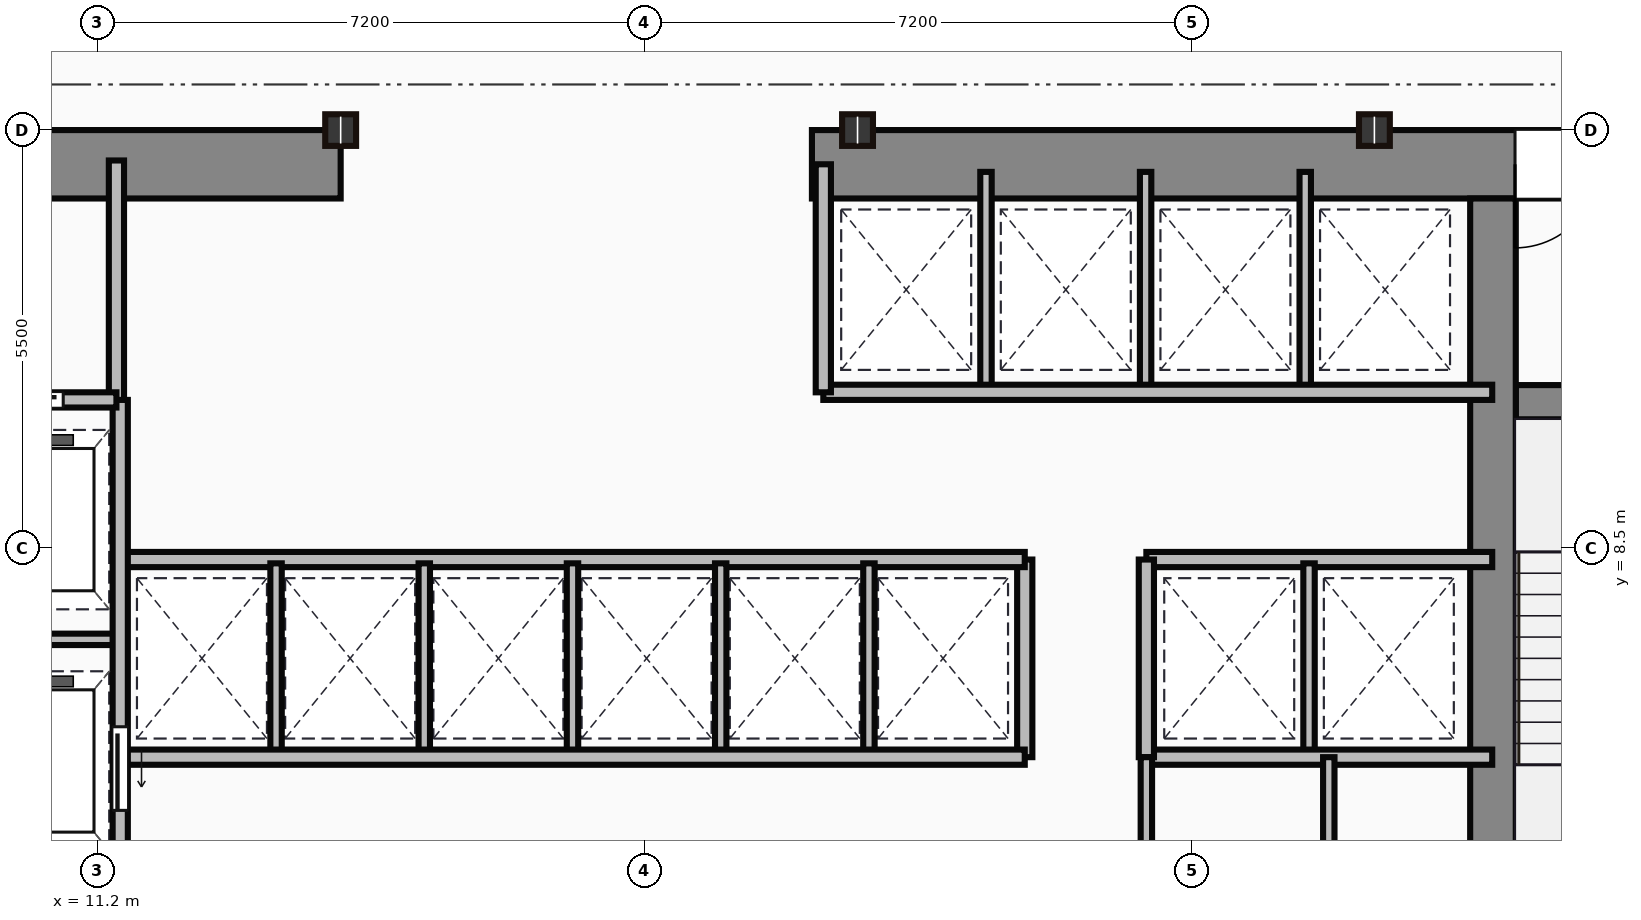
"""IFC4 building model, lengths in metres.
Left out: names, types, materials, properties, quantities, classifications, styles, units other than length and angle.
Written with IfcOpenShell. Run it as: python <this file> out.ifc"""

import sys

from ifc_helpers import new_model, si_unit, direction, frame, frame_2d, origin, origin_2d, place, context, subcontext, project, spatial, rectangle, i_section, extrude, source, transform, mapped, element, fill, save


model = new_model("IFC4")
c1 = context("Model", 3, precision=1e-05, world=origin(), true_north=direction((0.0, 1.0)))
c2 = subcontext(c1, "Body", "Model", "MODEL_VIEW")
j1 = project(units=[si_unit("LENGTHUNIT", "METRE"), si_unit("PLANEANGLEUNIT", "RADIAN")], contexts=[c1])
p1 = place(None, origin())
s1 = spatial("IfcSite", under=j1, at=p1, CompositionType="ELEMENT")
p2 = place(p1, origin())
s2 = spatial("IfcBuilding", under=s1, at=p2, CompositionType="ELEMENT")
p3 = place(p2, frame((0.0, 0.0, 65.35)))
s3 = spatial("IfcBuildingStorey", under=s2, at=p3, CompositionType="ELEMENT", Elevation=65.35)
m1 = source(origin(), c2, "Body", "SweptSolid", [
    extrude(rectangle(XDim=9.1, YDim=0.9, at=frame_2d((4.55, 0.0))), origin(), (0.0, 0.0, 1.0), 3.65),
])
p4 = place(p3, frame((5.3, 13.55, 0.0), z_axis=(0.0, 0.0, 1.0), x_axis=(1.0, 0.0, 0.0)))
e1 = element("IfcWall", 1, at=p4, inside=s3, PredefinedType="SHEAR", context=c2, shape_type="MappedRepresentation", body=[
    mapped(m1, transform((0.0, 0.0, 0.0))),
])
p5 = place(p4, frame((4.1, 0.0, 0.0)))
e2 = element("IfcOpeningElement", 2, at=p5, cuts=e1, PredefinedType="OPENING", context=c2, shape_type="SweptSolid", body=[
    extrude(rectangle(XDim=1.1, YDim=2.15, at=frame_2d((0.55, 1.075))), frame((0.0, 0.46, 0.0), z_axis=(0.0, -1.0, 0.0), x_axis=(1.0, 0.0, 0.0)), (0.0, 0.0, 1.0), 0.92),
])
m2 = source(origin(), c2, "Body", "SweptSolid", [
    extrude(rectangle(XDim=12.6, YDim=0.9, at=frame_2d((6.3, 0.0))), origin(), (0.0, 0.0, 1.0), 3.65),
])
p6 = place(p3, frame((20.6, 13.55, 0.0), z_axis=(0.0, 0.0, 1.0), x_axis=(1.0, 0.0, 0.0)))
e3 = element("IfcWall", 3, at=p6, inside=s3, PredefinedType="SHEAR", context=c2, shape_type="MappedRepresentation", body=[
    mapped(m2, transform((0.0, 0.0, 0.0))),
])
p7 = place(p6, frame((9.25, 0.0, 0.0)))
e4 = element("IfcOpeningElement", 4, at=p7, cuts=e3, PredefinedType="OPENING", context=c2, shape_type="SweptSolid", body=[
    extrude(rectangle(XDim=1.1, YDim=2.15, at=frame_2d((0.55, 1.075))), frame((0.0, 0.46, 0.0), z_axis=(0.0, -1.0, 0.0), x_axis=(1.0, 0.0, 0.0)), (0.0, 0.0, 1.0), 0.92),
])
m3 = source(origin(), c2, "Body", "SweptSolid", [
    extrude(rectangle(XDim=12.2, YDim=0.6, at=frame_2d((6.1, 0.0))), origin(), (0.0, 0.0, 1.0), 3.65),
])
p8 = place(p3, frame((29.56, 0.9, 0.0), z_axis=(0.0, 0.0, 1.0), x_axis=(0.0, 1.0, 0.0)))
e5 = element("IfcWall", 5, at=p8, inside=s3, PredefinedType="SHEAR", context=c2, shape_type="MappedRepresentation", body=[
    mapped(m3, transform((0.0, 0.0, 0.0))),
])
m4 = source(origin(), c2, "Body", "SweptSolid", [
    extrude(rectangle(XDim=3.39, YDim=0.45, at=frame_2d((1.695, 0.0))), origin(), (0.0, 0.0, 1.0), 3.65),
])
p9 = place(p3, frame((29.86, 10.42, 0.0), z_axis=(0.0, 0.0, 1.0), x_axis=(1.0, 0.0, 0.0)))
e6 = element("IfcWall", 6, at=p9, inside=s3, PredefinedType="SHEAR", context=c2, shape_type="MappedRepresentation", body=[
    mapped(m4, transform((0.0, 0.0, 0.0))),
])
p10 = place(p9, frame((1.1, 0.0, 0.0)))
e7 = element("IfcOpeningElement", 7, at=p10, cuts=e6, PredefinedType="OPENING", context=c2, shape_type="SweptSolid", body=[
    extrude(rectangle(XDim=1.1, YDim=2.15, at=frame_2d((0.55, 1.075))), frame((0.0, 0.235, 0.0), z_axis=(0.0, -1.0, 0.0), x_axis=(1.0, 0.0, 0.0)), (0.0, 0.0, 1.0), 0.47),
])
m5 = source(origin(), c2, "Body", "SweptSolid", [
    extrude(i_section(OverallWidth=0.406, OverallDepth=0.416, WebThickness=0.03, FlangeThickness=0.048, at=origin_2d()), origin(), (0.0, 0.0, 1.0), 3.65),
])
for number, where, z_axis, x_axis in (
    (8, (14.4, 14.0, 0.0), (0.0, 0.0, 1.0), (1.0, 0.0, 0.0)),
    (9, (21.2, 14.0, 0.0), (0.0, 0.0, 1.0), (1.0, 0.0, 0.0)),
    (10, (28.0, 14.0, 0.0), (0.0, 0.0, 1.0), (1.0, 0.0, 0.0)),
):
    element("IfcColumn", number, at=place(p3, frame(where, z_axis=z_axis, x_axis=x_axis)), inside=s3, PredefinedType="COLUMN", context=c2, shape_type="MappedRepresentation", body=[
        mapped(m5, transform((0.0, 0.0, 0.0))),
    ])
m6 = source(origin(), c2, "Body", "SweptSolid", [
    extrude(rectangle(XDim=3.18, YDim=0.2, at=frame_2d((1.59, 0.0))), origin(), (0.0, 0.0, 1.0), 3.4),
])
p11 = place(p3, frame((11.45, 10.42, 0.0), z_axis=(0.0, 0.0, 1.0), x_axis=(0.0, 1.0, 0.0)))
e11 = element("IfcWall", 11, at=p11, inside=s3, PredefinedType="PARTITIONING", context=c2, shape_type="MappedRepresentation", body=[
    mapped(m6, transform((0.0, 0.0, 0.0))),
])
m7 = source(origin(), c2, "Body", "SweptSolid", [
    extrude(rectangle(XDim=2.35, YDim=0.2, at=frame_2d((1.175, 0.0))), origin(), (0.0, 0.0, 1.0), 3.4),
])
p12 = place(p3, frame((9.1, 10.45, 0.0), z_axis=(0.0, 0.0, 1.0), x_axis=(1.0, 0.0, 0.0)))
e12 = element("IfcWall", 12, at=p12, inside=s3, PredefinedType="PARTITIONING", context=c2, shape_type="MappedRepresentation", body=[
    mapped(m7, transform((0.0, 0.0, 0.0))),
])
p13 = place(p12, frame((0.55, 0.0, 0.0)))
e13 = element("IfcOpeningElement", 13, at=p13, cuts=e12, PredefinedType="OPENING", context=c2, shape_type="SweptSolid", body=[
    extrude(rectangle(XDim=1.1, YDim=2.15, at=frame_2d((0.55, 1.075))), frame((0.0, 0.11, 0.0), z_axis=(0.0, -1.0, 0.0), x_axis=(1.0, 0.0, 0.0)), (0.0, 0.0, 1.0), 0.22),
])
m8 = source(origin(), c2, "Body", "SweptSolid", [
    extrude(rectangle(XDim=9.6, YDim=0.2, at=frame_2d((4.8, 0.0))), origin(), (0.0, 0.0, 1.0), 3.4),
])
p14 = place(p3, frame((11.5, 0.85, 0.0), z_axis=(0.0, 0.0, 1.0), x_axis=(0.0, 1.0, 0.0)))
e14 = element("IfcWall", 14, at=p14, inside=s3, PredefinedType="PARTITIONING", context=c2, shape_type="MappedRepresentation", body=[
    mapped(m8, transform((0.0, 0.0, 0.0))),
])
p15 = place(p14, frame((4.2, 0.0, 0.0)))
e15 = element("IfcOpeningElement", 15, at=p15, cuts=e14, PredefinedType="OPENING", context=c2, shape_type="SweptSolid", body=[
    extrude(rectangle(XDim=1.1, YDim=2.15, at=frame_2d((0.55, 1.075))), frame((0.0, 0.11, 0.0), z_axis=(0.0, -1.0, 0.0), x_axis=(1.0, 0.0, 0.0)), (0.0, 0.0, 1.0), 0.22),
])
p16 = place(p14, frame((0.9, 0.0, 0.0)))
e16 = element("IfcOpeningElement", 16, at=p16, cuts=e14, PredefinedType="OPENING", context=c2, shape_type="SweptSolid", body=[
    extrude(rectangle(XDim=1.2, YDim=2.15, at=frame_2d((0.6, 1.075))), frame((0.0, 0.11, 0.0), z_axis=(0.0, -1.0, 0.0), x_axis=(1.0, 0.0, 0.0)), (0.0, 0.0, 1.0), 0.22),
])
m9 = source(origin(), c2, "Body", "SweptSolid", [
    extrude(rectangle(XDim=2.4, YDim=0.15, at=frame_2d((1.2, 0.0))), origin(), (0.0, 0.0, 1.0), 3.4),
])
p17 = place(p3, frame((9.1, 7.3, 0.0), z_axis=(0.0, 0.0, 1.0), x_axis=(1.0, 0.0, 0.0)))
e17 = element("IfcWall", 17, at=p17, inside=s3, PredefinedType="PARTITIONING", context=c2, shape_type="MappedRepresentation", body=[
    mapped(m9, transform((0.0, 0.0, 0.0))),
])
m10 = source(origin(), c2, "Body", "SweptSolid", [
    extrude(rectangle(XDim=11.85, YDim=0.2, at=frame_2d((5.925, 0.0))), origin(), (0.0, 0.0, 1.0), 3.4),
])
for number, where, z_axis, x_axis in (
    (18, (11.55, 5.75, 0.0), (0.0, 0.0, 1.0), (1.0, 0.0, 0.0)),
    (19, (11.55, 8.35, 0.0), (0.0, 0.0, 1.0), (1.0, 0.0, 0.0)),
):
    element("IfcWall", number, at=place(p3, frame(where, z_axis=z_axis, x_axis=x_axis)), inside=s3, PredefinedType="PARTITIONING", context=c2, shape_type="MappedRepresentation", body=[
        mapped(m10, transform((0.0, 0.0, 0.0))),
    ])
m11 = source(origin(), c2, "Body", "SweptSolid", [
    extrude(rectangle(XDim=2.6, YDim=0.2, at=frame_2d((1.3, 0.0))), origin(), (0.0, 0.0, 1.0), 3.4),
])
p18 = place(p3, frame((23.4, 5.75, 0.0), z_axis=(0.0, 0.0, 1.0), x_axis=(0.0, 1.0, 0.0)))
e20 = element("IfcWall", 20, at=p18, inside=s3, PredefinedType="PARTITIONING", context=c2, shape_type="MappedRepresentation", body=[
    mapped(m11, transform((0.0, 0.0, 0.0))),
])
m12 = source(origin(), c2, "Body", "SweptSolid", [
    extrude(rectangle(XDim=2.5, YDim=0.15, at=frame_2d((1.25, 0.0))), origin(), (0.0, 0.0, 1.0), 3.4),
])
for number, where, z_axis, x_axis in (
    (21, (13.55, 5.8, 0.0), (0.0, 0.0, 1.0), (0.0, 1.0, 0.0)),
    (22, (15.5, 5.8, 0.0), (0.0, 0.0, 1.0), (0.0, 1.0, 0.0)),
    (23, (17.45, 5.8, 0.0), (0.0, 0.0, 1.0), (0.0, 1.0, 0.0)),
    (24, (19.4, 5.8, 0.0), (0.0, 0.0, 1.0), (0.0, 1.0, 0.0)),
    (25, (21.35, 5.8, 0.0), (0.0, 0.0, 1.0), (0.0, 1.0, 0.0)),
):
    element("IfcWall", number, at=place(p3, frame(where, z_axis=z_axis, x_axis=x_axis)), inside=s3, PredefinedType="PARTITIONING", context=c2, shape_type="MappedRepresentation", body=[
        mapped(m12, transform((0.0, 0.0, 0.0))),
    ])
m13 = source(origin(), c2, "Body", "SweptSolid", [
    extrude(rectangle(XDim=8.8, YDim=0.2, at=frame_2d((4.4, 0.0))), origin(), (0.0, 0.0, 1.0), 3.4),
])
p19 = place(p3, frame((20.75, 10.55, 0.0), z_axis=(0.0, 0.0, 1.0), x_axis=(1.0, 0.0, 0.0)))
e26 = element("IfcWall", 26, at=p19, inside=s3, PredefinedType="PARTITIONING", context=c2, shape_type="MappedRepresentation", body=[
    mapped(m13, transform((0.0, 0.0, 0.0))),
])
m14 = source(origin(), c2, "Body", "SweptSolid", [
    extrude(rectangle(XDim=3.0, YDim=0.2, at=frame_2d((1.5, 0.0))), origin(), (0.0, 0.0, 1.0), 3.4),
])
p20 = place(p3, frame((20.75, 10.55, 0.0), z_axis=(0.0, 0.0, 1.0), x_axis=(0.0, 1.0, 0.0)))
e27 = element("IfcWall", 27, at=p20, inside=s3, PredefinedType="PARTITIONING", context=c2, shape_type="MappedRepresentation", body=[
    mapped(m14, transform((0.0, 0.0, 0.0))),
])
m15 = source(origin(), c2, "Body", "SweptSolid", [
    extrude(rectangle(XDim=2.85, YDim=0.15, at=frame_2d((1.425, 0.0))), origin(), (0.0, 0.0, 1.0), 3.4),
])
for number, where, z_axis, x_axis in (
    (28, (22.89, 10.6, 0.0), (0.0, 0.0, 1.0), (0.0, 1.0, 0.0)),
    (29, (24.99, 10.6, 0.0), (0.0, 0.0, 1.0), (0.0, 1.0, 0.0)),
    (30, (27.09, 10.6, 0.0), (0.0, 0.0, 1.0), (0.0, 1.0, 0.0)),
):
    element("IfcWall", number, at=place(p3, frame(where, z_axis=z_axis, x_axis=x_axis)), inside=s3, PredefinedType="PARTITIONING", context=c2, shape_type="MappedRepresentation", body=[
        mapped(m15, transform((0.0, 0.0, 0.0))),
    ])
m16 = source(origin(), c2, "Body", "SweptSolid", [
    extrude(rectangle(XDim=4.55, YDim=0.2, at=frame_2d((2.275, 0.0))), origin(), (0.0, 0.0, 1.0), 3.4),
])
for number, where, z_axis, x_axis in (
    (31, (25.0, 8.35, 0.0), (0.0, 0.0, 1.0), (1.0, 0.0, 0.0)),
    (32, (25.0, 5.75, 0.0), (0.0, 0.0, 1.0), (1.0, 0.0, 0.0)),
):
    element("IfcWall", number, at=place(p3, frame(where, z_axis=z_axis, x_axis=x_axis)), inside=s3, PredefinedType="PARTITIONING", context=c2, shape_type="MappedRepresentation", body=[
        mapped(m16, transform((0.0, 0.0, 0.0))),
    ])
p21 = place(p3, frame((25.0, 5.75, 0.0), z_axis=(0.0, 0.0, 1.0), x_axis=(0.0, 1.0, 0.0)))
e33 = element("IfcWall", 33, at=p21, inside=s3, PredefinedType="PARTITIONING", context=c2, shape_type="MappedRepresentation", body=[
    mapped(m11, transform((0.0, 0.0, 0.0))),
])
p22 = place(p3, frame((27.14, 5.8, 0.0), z_axis=(0.0, 0.0, 1.0), x_axis=(0.0, 1.0, 0.0)))
e34 = element("IfcWall", 34, at=p22, inside=s3, PredefinedType="PARTITIONING", context=c2, shape_type="MappedRepresentation", body=[
    mapped(m12, transform((0.0, 0.0, 0.0))),
])
m17 = source(origin(), c2, "Body", "SweptSolid", [
    extrude(rectangle(XDim=4.9, YDim=0.15, at=frame_2d((2.45, 0.0))), origin(), (0.0, 0.0, 1.0), 3.4),
])
p23 = place(p3, frame((25.0, 0.85, 0.0), z_axis=(0.0, 0.0, 1.0), x_axis=(0.0, 1.0, 0.0)))
e35 = element("IfcWall", 35, at=p23, inside=s3, PredefinedType="PARTITIONING", context=c2, shape_type="MappedRepresentation", body=[
    mapped(m17, transform((0.0, 0.0, 0.0))),
])
p24 = place(p23, frame((2.5, 0.0, 0.0)))
e36 = element("IfcOpeningElement", 36, at=p24, cuts=e35, PredefinedType="OPENING", context=c2, shape_type="SweptSolid", body=[
    extrude(rectangle(XDim=0.95, YDim=2.15, at=frame_2d((0.475, 1.075))), frame((0.0, 0.085, 0.0), z_axis=(0.0, -1.0, 0.0), x_axis=(1.0, 0.0, 0.0)), (0.0, 0.0, 1.0), 0.17),
])
m18 = source(origin(), c2, "Body", "SweptSolid", [
    extrude(rectangle(XDim=3.4, YDim=0.15, at=frame_2d((1.7, 0.0))), origin(), (0.0, 0.0, 1.0), 3.4),
])
p25 = place(p3, frame((27.4, 2.35, 0.0), z_axis=(0.0, 0.0, 1.0), x_axis=(0.0, 1.0, 0.0)))
e37 = element("IfcWall", 37, at=p25, inside=s3, PredefinedType="PARTITIONING", context=c2, shape_type="MappedRepresentation", body=[
    mapped(m18, transform((0.0, 0.0, 0.0))),
])
p26 = place(p25, frame((1.1, 0.0, 0.0)))
e38 = element("IfcOpeningElement", 38, at=p26, cuts=e37, PredefinedType="OPENING", context=c2, shape_type="SweptSolid", body=[
    extrude(rectangle(XDim=0.85, YDim=2.1, at=frame_2d((0.425, 1.05))), frame((0.0, 0.085, 0.0), z_axis=(0.0, -1.0, 0.0), x_axis=(1.0, 0.0, 0.0)), (0.0, 0.0, 1.0), 0.17),
])
m19 = source(origin(), c2, "Body", "SweptSolid", [
    extrude(rectangle(XDim=1.1, YDim=2.15, at=frame_2d((0.55, 1.075))), frame((0.0, 0.025, 0.0), z_axis=(0.0, -1.0, 0.0), x_axis=(1.0, 0.0, 0.0)), (0.0, 0.0, 1.0), 0.05),
])
p27 = place(p7, origin())
e39 = element("IfcDoor", 39, at=p27, inside=s3, OperationType="SINGLE_SWING_LEFT", PredefinedType="DOOR", context=c2, shape_type="MappedRepresentation", body=[
    mapped(m19, transform((0.0, 0.0, 0.0))),
])
fill(e4, e39)
p28 = place(p13, origin())
e40 = element("IfcDoor", 40, at=p28, inside=s3, OperationType="SLIDING_TO_LEFT", PredefinedType="DOOR", context=c2, shape_type="MappedRepresentation", body=[
    mapped(m19, transform((0.0, 0.0, 0.0))),
])
fill(e13, e40)
p29 = place(p15, frame((1.1, 0.0, 0.0), z_axis=(0.0, 0.0, 1.0), x_axis=(-1.0, 0.0, 0.0)))
e41 = element("IfcDoor", 41, at=p29, inside=s3, OperationType="SLIDING_TO_LEFT", PredefinedType="DOOR", context=c2, shape_type="MappedRepresentation", body=[
    mapped(m19, transform((0.0, 0.0, 0.0))),
])
fill(e15, e41)
save(model, sys.argv[1])
